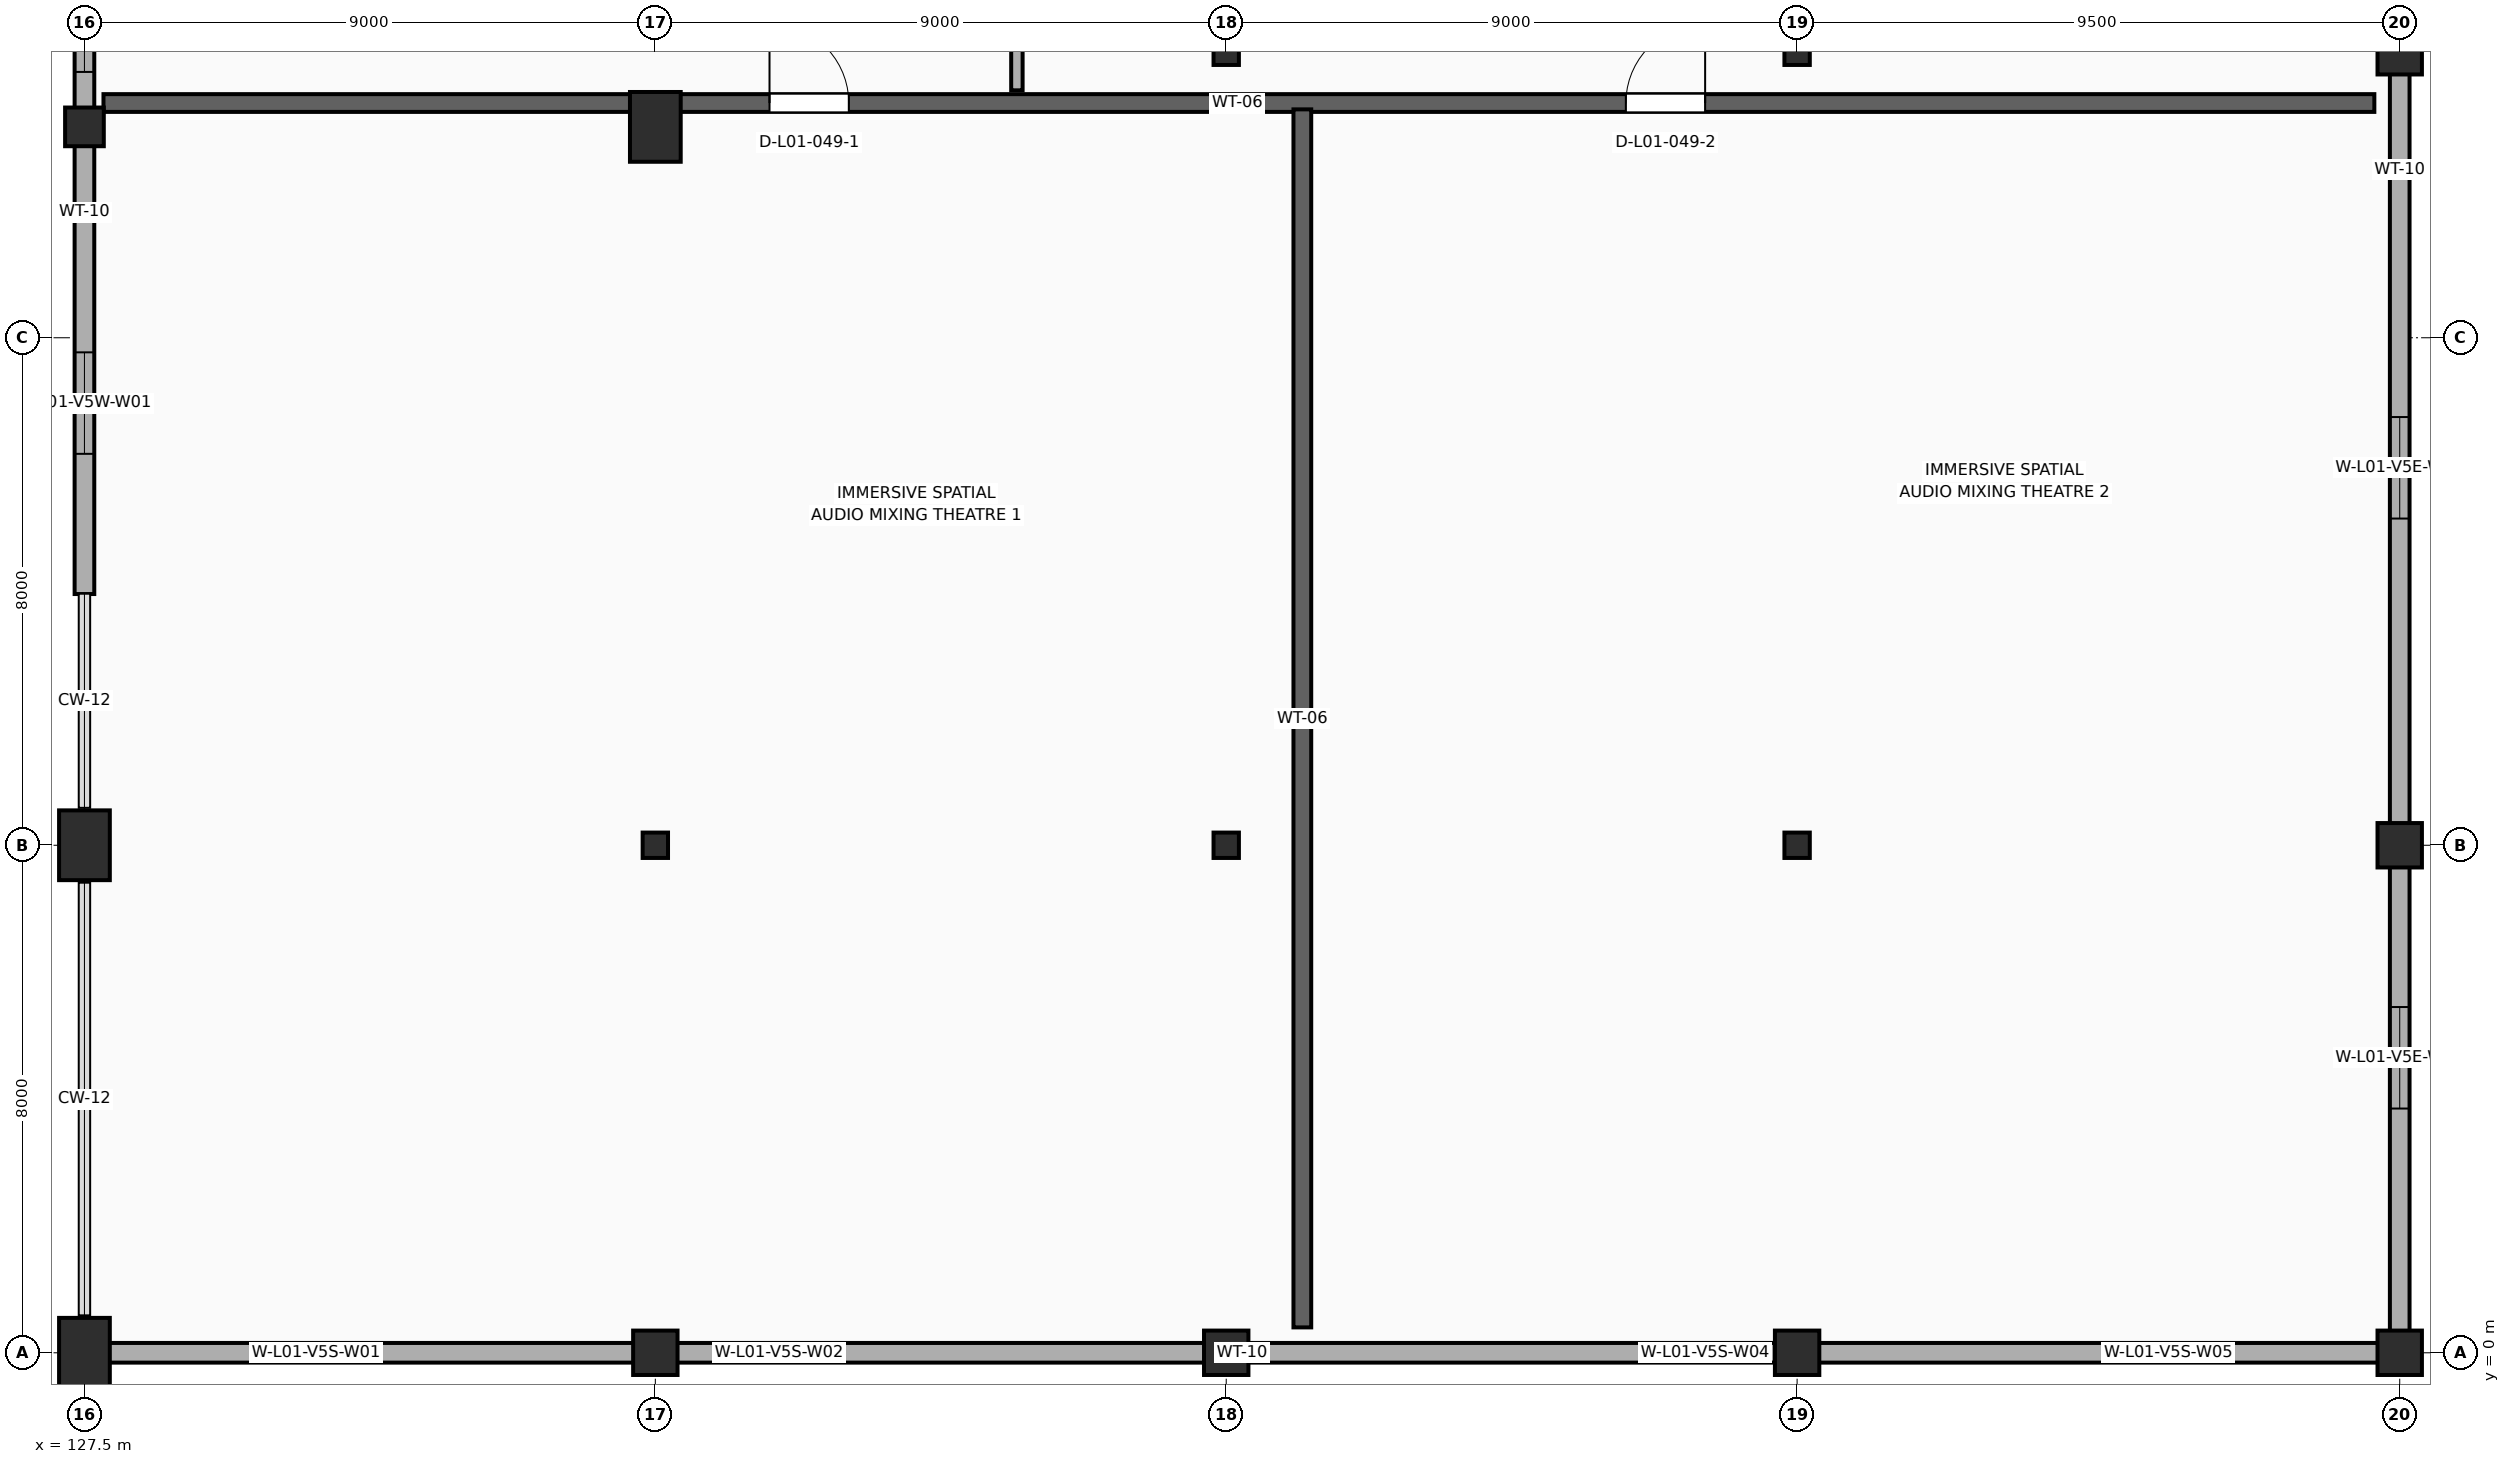
"""IFC4 building model, lengths in metres.
Left out: names, types, materials, properties, quantities, classifications, styles, units other than length and angle.
Written with IfcOpenShell. Run it as: python <this file> out.ifc"""

import sys

from ifc_helpers import new_model, si_unit, direction, frame, frame_2d, origin, origin_2d, place, context, subcontext, project, spatial, rectangle, hollow_rectangle, hollow_circle, extrude, element, fill, save


model = new_model("IFC4")
c1 = context("Model", 3, precision=1e-05, world=origin(), true_north=direction((0.0, 1.0)))
c2 = subcontext(c1, "Body", "Model", "MODEL_VIEW")
j1 = project(units=[si_unit("LENGTHUNIT", "METRE"), si_unit("PLANEANGLEUNIT", "RADIAN")], contexts=[c1])
p1 = place(None, origin())
s1 = spatial("IfcSite", under=j1, at=p1, CompositionType="ELEMENT")
p2 = place(p1, origin())
s2 = spatial("IfcBuilding", under=s1, at=p2, CompositionType="ELEMENT")
p3 = place(p2, frame((0.0, 0.0, 5.4)))
s3 = spatial("IfcBuildingStorey", under=s2, at=p3, CompositionType="ELEMENT", Elevation=5.4)
for number, where, z_axis, x_axis in (
    (1, (127.5, 0.0, 0.0), (0.0, 0.0, 1.0), (1.0, 0.0, 0.0)),
    (2, (127.5, 8.0, 0.0), (0.0, 0.0, 1.0), (1.0, 0.0, 0.0)),
):
    element("IfcColumn", number, at=place(p3, frame(where, z_axis=z_axis, x_axis=x_axis)), inside=s3, PredefinedType="COLUMN", context=c2, shape_type="SweptSolid", body=[
        extrude(rectangle(XDim=0.8, YDim=1.1, at=origin_2d()), origin(), (0.0, 0.0, 1.0), 4.54),
    ])
p4 = place(p3, frame((136.5, 0.0, 0.0), z_axis=(0.0, 0.0, 1.0), x_axis=(1.0, 0.0, 0.0)))
e3 = element("IfcColumn", 3, at=p4, inside=s3, PredefinedType="COLUMN", context=c2, shape_type="SweptSolid", body=[
    extrude(rectangle(XDim=0.7, YDim=0.7, at=origin_2d()), origin(), (0.0, 0.0, 1.0), 4.54),
])
p5 = place(p3, frame((136.5, 8.0, 0.0), z_axis=(0.0, 0.0, 1.0), x_axis=(1.0, 0.0, 0.0)))
e4 = element("IfcColumn", 4, at=p5, inside=s3, PredefinedType="COLUMN", context=c2, shape_type="SweptSolid", body=[
    extrude(hollow_rectangle(XDim=0.4, YDim=0.4, WallThickness=0.016, at=origin_2d()), origin(), (0.0, 0.0, 1.0), 4.54),
])
p6 = place(p3, frame((145.5, 0.0, 0.0), z_axis=(0.0, 0.0, 1.0), x_axis=(1.0, 0.0, 0.0)))
e5 = element("IfcColumn", 5, at=p6, inside=s3, PredefinedType="COLUMN", context=c2, shape_type="SweptSolid", body=[
    extrude(rectangle(XDim=0.7, YDim=0.7, at=origin_2d()), origin(), (0.0, 0.0, 1.0), 4.54),
])
for number, where, z_axis, x_axis in (
    (6, (145.5, 8.0, 0.0), (0.0, 0.0, 1.0), (1.0, 0.0, 0.0)),
    (7, (145.5, 20.5, 0.0), (0.0, 0.0, 1.0), (1.0, 0.0, 0.0)),
):
    element("IfcColumn", number, at=place(p3, frame(where, z_axis=z_axis, x_axis=x_axis)), inside=s3, PredefinedType="COLUMN", context=c2, shape_type="SweptSolid", body=[
        extrude(hollow_rectangle(XDim=0.4, YDim=0.4, WallThickness=0.016, at=origin_2d()), origin(), (0.0, 0.0, 1.0), 4.54),
    ])
p7 = place(p3, frame((154.5, 0.0, 0.0), z_axis=(0.0, 0.0, 1.0), x_axis=(1.0, 0.0, 0.0)))
e8 = element("IfcColumn", 8, at=p7, inside=s3, PredefinedType="COLUMN", context=c2, shape_type="SweptSolid", body=[
    extrude(rectangle(XDim=0.7, YDim=0.7, at=origin_2d()), origin(), (0.0, 0.0, 1.0), 4.54),
])
for number, where, z_axis, x_axis in (
    (9, (154.5, 8.0, 0.0), (0.0, 0.0, 1.0), (1.0, 0.0, 0.0)),
    (10, (154.5, 20.5, 0.0), (0.0, 0.0, 1.0), (1.0, 0.0, 0.0)),
):
    element("IfcColumn", number, at=place(p3, frame(where, z_axis=z_axis, x_axis=x_axis)), inside=s3, PredefinedType="COLUMN", context=c2, shape_type="SweptSolid", body=[
        extrude(hollow_rectangle(XDim=0.4, YDim=0.4, WallThickness=0.016, at=origin_2d()), origin(), (0.0, 0.0, 1.0), 4.54),
    ])
for number, where, z_axis, x_axis in (
    (11, (164.0, 0.0, 0.0), (0.0, 0.0, 1.0), (1.0, 0.0, 0.0)),
    (12, (164.0, 8.0, 0.0), (0.0, 0.0, 1.0), (1.0, 0.0, 0.0)),
    (13, (164.0, 20.5, 0.0), (0.0, 0.0, 1.0), (1.0, 0.0, 0.0)),
):
    element("IfcColumn", number, at=place(p3, frame(where, z_axis=z_axis, x_axis=x_axis)), inside=s3, PredefinedType="COLUMN", context=c2, shape_type="SweptSolid", body=[
        extrude(rectangle(XDim=0.7, YDim=0.7, at=origin_2d()), origin(), (0.0, 0.0, 1.0), 4.54),
    ])
p8 = place(p3, frame((136.5, 19.324, 0.0), z_axis=(0.0, 0.0, 1.0), x_axis=(1.0, 0.0, 0.0)))
e14 = element("IfcColumn", 14, at=p8, inside=s3, PredefinedType="COLUMN", context=c2, shape_type="SweptSolid", body=[
    extrude(rectangle(XDim=0.8, YDim=1.1, at=origin_2d()), origin(), (0.0, 0.0, 1.0), 4.54),
])
p9 = place(p3, frame((127.5, 19.324, 0.0), z_axis=(0.0, 0.0, 1.0), x_axis=(1.0, 0.0, 0.0)))
e15 = element("IfcColumn", 15, at=p9, inside=s3, PredefinedType="COLUMN", context=c2, shape_type="SweptSolid", body=[
    extrude(hollow_circle(Radius=0.305, WallThickness=0.02, at=origin_2d()), origin(), (0.0, 0.0, 1.0), 4.54),
])
p10 = place(p3, frame((127.5, 11.96, 0.0), z_axis=(0.0, 0.0, 1.0), x_axis=(0.0, 1.0, 0.0)))
e16 = element("IfcWall", 16, at=p10, inside=s3, PredefinedType="STANDARD", context=c2, shape_type="SweptSolid", body=[
    extrude(rectangle(XDim=12.04, YDim=0.31, at=frame_2d((6.02, 0.0))), origin(), (0.0, 0.0, 1.0), 4.148),
])
p11 = place(p10, frame((2.21, 0.0, 1.0)))
e17 = element("IfcOpeningElement", 17, at=p11, cuts=e16, PredefinedType="OPENING", context=c2, shape_type="SweptSolid", body=[
    extrude(rectangle(XDim=1.6, YDim=2.2, at=frame_2d((0.8, 1.1))), frame((0.0, 0.167, 0.0), z_axis=(0.0, -1.0, 0.0), x_axis=(1.0, 0.0, 0.0)), (0.0, 0.0, 1.0), 0.334),
])
p12 = place(p10, frame((8.23, 0.0, 1.0)))
e18 = element("IfcOpeningElement", 18, at=p12, cuts=e16, PredefinedType="OPENING", context=c2, shape_type="SweptSolid", body=[
    extrude(rectangle(XDim=1.6, YDim=2.2, at=frame_2d((0.8, 1.1))), frame((0.0, 0.167, 0.0), z_axis=(0.0, -1.0, 0.0), x_axis=(1.0, 0.0, 0.0)), (0.0, 0.0, 1.0), 0.334),
])
p13 = place(p3, frame((127.5, 0.0, 0.0), z_axis=(0.0, 0.0, 1.0), x_axis=(1.0, 0.0, 0.0)))
e19 = element("IfcWall", 19, at=p13, inside=s3, PredefinedType="STANDARD", context=c2, shape_type="SweptSolid", body=[
    extrude(rectangle(XDim=36.5, YDim=0.31, at=frame_2d((18.25, 0.0))), origin(), (0.0, 0.0, 1.0), 4.198),
])
p14 = place(p13, frame((2.85, 0.0, 1.0)))
e20 = element("IfcOpeningElement", 20, at=p14, cuts=e19, PredefinedType="OPENING", context=c2, shape_type="SweptSolid", body=[
    extrude(rectangle(XDim=1.6, YDim=2.2, at=frame_2d((0.8, 1.1))), frame((0.0, 0.167, 0.0), z_axis=(0.0, -1.0, 0.0), x_axis=(1.0, 0.0, 0.0)), (0.0, 0.0, 1.0), 0.334),
])
p15 = place(p13, frame((10.15, 0.0, 1.0)))
e21 = element("IfcOpeningElement", 21, at=p15, cuts=e19, PredefinedType="OPENING", context=c2, shape_type="SweptSolid", body=[
    extrude(rectangle(XDim=1.6, YDim=2.2, at=frame_2d((0.8, 1.1))), frame((0.0, 0.167, 0.0), z_axis=(0.0, -1.0, 0.0), x_axis=(1.0, 0.0, 0.0)), (0.0, 0.0, 1.0), 0.334),
])
p16 = place(p13, frame((24.75, 0.0, 1.0)))
e22 = element("IfcOpeningElement", 22, at=p16, cuts=e19, PredefinedType="OPENING", context=c2, shape_type="SweptSolid", body=[
    extrude(rectangle(XDim=1.6, YDim=2.2, at=frame_2d((0.8, 1.1))), frame((0.0, 0.167, 0.0), z_axis=(0.0, -1.0, 0.0), x_axis=(1.0, 0.0, 0.0)), (0.0, 0.0, 1.0), 0.334),
])
p17 = place(p13, frame((32.05, 0.0, 1.0)))
e23 = element("IfcOpeningElement", 23, at=p17, cuts=e19, PredefinedType="OPENING", context=c2, shape_type="SweptSolid", body=[
    extrude(rectangle(XDim=1.6, YDim=2.2, at=frame_2d((0.8, 1.1))), frame((0.0, 0.167, 0.0), z_axis=(0.0, -1.0, 0.0), x_axis=(1.0, 0.0, 0.0)), (0.0, 0.0, 1.0), 0.334),
])
p18 = place(p3, frame((164.0, 0.0, 0.0), z_axis=(0.0, 0.0, 1.0), x_axis=(0.0, 1.0, 0.0)))
e24 = element("IfcWall", 24, at=p18, inside=s3, PredefinedType="STANDARD", context=c2, shape_type="SweptSolid", body=[
    extrude(rectangle(XDim=46.5, YDim=0.31, at=frame_2d((23.25, 0.0))), origin(), (0.0, 0.0, 1.0), 4.198),
])
p19 = place(p18, frame((3.85, 0.0, 1.0)))
e25 = element("IfcOpeningElement", 25, at=p19, cuts=e24, PredefinedType="OPENING", context=c2, shape_type="SweptSolid", body=[
    extrude(rectangle(XDim=1.6, YDim=2.2, at=frame_2d((0.8, 1.1))), frame((0.0, 0.167, 0.0), z_axis=(0.0, -1.0, 0.0), x_axis=(1.0, 0.0, 0.0)), (0.0, 0.0, 1.0), 0.334),
])
p20 = place(p18, frame((13.15, 0.0, 1.0)))
e26 = element("IfcOpeningElement", 26, at=p20, cuts=e24, PredefinedType="OPENING", context=c2, shape_type="SweptSolid", body=[
    extrude(rectangle(XDim=1.6, YDim=2.2, at=frame_2d((0.8, 1.1))), frame((0.0, 0.167, 0.0), z_axis=(0.0, -1.0, 0.0), x_axis=(1.0, 0.0, 0.0)), (0.0, 0.0, 1.0), 0.334),
])
p21 = place(p18, frame((22.45, 0.0, 1.0)))
e27 = element("IfcOpeningElement", 27, at=p21, cuts=e24, PredefinedType="OPENING", context=c2, shape_type="SweptSolid", body=[
    extrude(rectangle(XDim=1.6, YDim=2.2, at=frame_2d((0.8, 1.1))), frame((0.0, 0.167, 0.0), z_axis=(0.0, -1.0, 0.0), x_axis=(1.0, 0.0, 0.0)), (0.0, 0.0, 1.0), 0.334),
])
p22 = place(p18, frame((31.75, 0.0, 1.0)))
e28 = element("IfcOpeningElement", 28, at=p22, cuts=e24, PredefinedType="OPENING", context=c2, shape_type="SweptSolid", body=[
    extrude(rectangle(XDim=1.6, YDim=2.2, at=frame_2d((0.8, 1.1))), frame((0.0, 0.167, 0.0), z_axis=(0.0, -1.0, 0.0), x_axis=(1.0, 0.0, 0.0)), (0.0, 0.0, 1.0), 0.334),
])
p23 = place(p18, frame((41.05, 0.0, 1.0)))
e29 = element("IfcOpeningElement", 29, at=p23, cuts=e24, PredefinedType="OPENING", context=c2, shape_type="SweptSolid", body=[
    extrude(rectangle(XDim=1.6, YDim=2.2, at=frame_2d((0.8, 1.1))), frame((0.0, 0.167, 0.0), z_axis=(0.0, -1.0, 0.0), x_axis=(1.0, 0.0, 0.0)), (0.0, 0.0, 1.0), 0.334),
])
p24 = place(p3, frame((127.8, 19.7, 0.0), z_axis=(0.0, 0.0, 1.0), x_axis=(1.0, 0.0, 0.0)))
e30 = element("IfcWall", 30, at=p24, inside=s3, PredefinedType="STANDARD", context=c2, shape_type="SweptSolid", body=[
    extrude(rectangle(XDim=35.8, YDim=0.28, at=frame_2d((17.9, 0.0))), origin(), (0.0, 0.0, 1.0), 4.5),
])
p25 = place(p24, frame((10.5, 0.0, 0.0)))
e31 = element("IfcOpeningElement", 31, at=p25, cuts=e30, PredefinedType="OPENING", context=c2, shape_type="SweptSolid", body=[
    extrude(rectangle(XDim=1.25, YDim=2.25, at=frame_2d((0.625, 1.125))), frame((0.0, 0.152, 0.0), z_axis=(0.0, -1.0, 0.0), x_axis=(1.0, 0.0, 0.0)), (0.0, 0.0, 1.0), 0.304),
])
p26 = place(p24, frame((24.0, 0.0, 0.0)))
e32 = element("IfcOpeningElement", 32, at=p26, cuts=e30, PredefinedType="OPENING", context=c2, shape_type="SweptSolid", body=[
    extrude(rectangle(XDim=1.25, YDim=2.25, at=frame_2d((0.625, 1.125))), frame((0.0, 0.152, 0.0), z_axis=(0.0, -1.0, 0.0), x_axis=(1.0, 0.0, 0.0)), (0.0, 0.0, 1.0), 0.304),
])
p27 = place(p3, frame((146.7, 0.4, 0.0), z_axis=(0.0, 0.0, 1.0), x_axis=(0.0, 1.0, 0.0)))
e33 = element("IfcWall", 33, at=p27, inside=s3, PredefinedType="STANDARD", context=c2, shape_type="SweptSolid", body=[
    extrude(rectangle(XDim=19.2, YDim=0.28, at=frame_2d((9.6, 0.0))), origin(), (0.0, 0.0, 1.0), 4.5),
])
p28 = place(p3, frame((142.2, 19.9, 0.0), z_axis=(0.0, 0.0, 1.0), x_axis=(0.0, 1.0, 0.0)))
e34 = element("IfcWall", 34, at=p28, inside=s3, PredefinedType="PARTITIONING", context=c2, shape_type="SweptSolid", body=[
    extrude(rectangle(XDim=26.3, YDim=0.18, at=frame_2d((13.15, 0.0))), origin(), (0.0, 0.0, 1.0), 4.148),
])
p29 = place(p28, frame((6.0, 0.0, 0.0)))
e35 = element("IfcOpeningElement", 35, at=p29, cuts=e34, PredefinedType="OPENING", context=c2, shape_type="SweptSolid", body=[
    extrude(rectangle(XDim=1.0, YDim=2.15, at=frame_2d((0.5, 1.075))), frame((0.0, 0.102, 0.0), z_axis=(0.0, -1.0, 0.0), x_axis=(1.0, 0.0, 0.0)), (0.0, 0.0, 1.0), 0.204),
])
p30 = place(p28, frame((16.0, 0.0, 0.0)))
e36 = element("IfcOpeningElement", 36, at=p30, cuts=e34, PredefinedType="OPENING", context=c2, shape_type="SweptSolid", body=[
    extrude(rectangle(XDim=0.9, YDim=2.15, at=frame_2d((0.45, 1.075))), frame((0.0, 0.102, 0.0), z_axis=(0.0, -1.0, 0.0), x_axis=(1.0, 0.0, 0.0)), (0.0, 0.0, 1.0), 0.204),
])
p31 = place(p28, frame((22.5, 0.0, 0.0)))
e37 = element("IfcOpeningElement", 37, at=p31, cuts=e34, PredefinedType="OPENING", context=c2, shape_type="SweptSolid", body=[
    extrude(rectangle(XDim=0.9, YDim=2.1, at=frame_2d((0.45, 1.05))), frame((0.0, 0.102, 0.0), z_axis=(0.0, -1.0, 0.0), x_axis=(1.0, 0.0, 0.0)), (0.0, 0.0, 1.0), 0.204),
])
p32 = place(p11, origin())
e38 = element("IfcWindow", 38, at=p32, inside=s3, PartitioningType="SINGLE_PANEL", PredefinedType="WINDOW", context=c2, shape_type="SweptSolid", body=[
    extrude(rectangle(XDim=1.6, YDim=2.2, at=frame_2d((0.8, 1.1))), frame((0.0, 0.03, 0.0), z_axis=(0.0, -1.0, 0.0), x_axis=(1.0, 0.0, 0.0)), (0.0, 0.0, 1.0), 0.06),
])
fill(e17, e38)
p33 = place(p12, origin())
e39 = element("IfcWindow", 39, at=p33, inside=s3, PartitioningType="SINGLE_PANEL", PredefinedType="WINDOW", context=c2, shape_type="SweptSolid", body=[
    extrude(rectangle(XDim=1.6, YDim=2.2, at=frame_2d((0.8, 1.1))), frame((0.0, 0.03, 0.0), z_axis=(0.0, -1.0, 0.0), x_axis=(1.0, 0.0, 0.0)), (0.0, 0.0, 1.0), 0.06),
])
fill(e18, e39)
p34 = place(p14, origin())
e40 = element("IfcWindow", 40, at=p34, inside=s3, PartitioningType="SINGLE_PANEL", PredefinedType="WINDOW", context=c2, shape_type="SweptSolid", body=[
    extrude(rectangle(XDim=1.6, YDim=2.2, at=frame_2d((0.8, 1.1))), frame((0.0, 0.03, 0.0), z_axis=(0.0, -1.0, 0.0), x_axis=(1.0, 0.0, 0.0)), (0.0, 0.0, 1.0), 0.06),
])
fill(e20, e40)
p35 = place(p15, origin())
e41 = element("IfcWindow", 41, at=p35, inside=s3, PartitioningType="SINGLE_PANEL", PredefinedType="WINDOW", context=c2, shape_type="SweptSolid", body=[
    extrude(rectangle(XDim=1.6, YDim=2.2, at=frame_2d((0.8, 1.1))), frame((0.0, 0.03, 0.0), z_axis=(0.0, -1.0, 0.0), x_axis=(1.0, 0.0, 0.0)), (0.0, 0.0, 1.0), 0.06),
])
fill(e21, e41)
p36 = place(p16, origin())
e42 = element("IfcWindow", 42, at=p36, inside=s3, PartitioningType="SINGLE_PANEL", PredefinedType="WINDOW", context=c2, shape_type="SweptSolid", body=[
    extrude(rectangle(XDim=1.6, YDim=2.2, at=frame_2d((0.8, 1.1))), frame((0.0, 0.03, 0.0), z_axis=(0.0, -1.0, 0.0), x_axis=(1.0, 0.0, 0.0)), (0.0, 0.0, 1.0), 0.06),
])
fill(e22, e42)
p37 = place(p17, origin())
e43 = element("IfcWindow", 43, at=p37, inside=s3, PartitioningType="SINGLE_PANEL", PredefinedType="WINDOW", context=c2, shape_type="SweptSolid", body=[
    extrude(rectangle(XDim=1.6, YDim=2.2, at=frame_2d((0.8, 1.1))), frame((0.0, 0.03, 0.0), z_axis=(0.0, -1.0, 0.0), x_axis=(1.0, 0.0, 0.0)), (0.0, 0.0, 1.0), 0.06),
])
fill(e23, e43)
p38 = place(p19, origin())
e44 = element("IfcWindow", 44, at=p38, inside=s3, PartitioningType="SINGLE_PANEL", PredefinedType="WINDOW", context=c2, shape_type="SweptSolid", body=[
    extrude(rectangle(XDim=1.6, YDim=2.2, at=frame_2d((0.8, 1.1))), frame((0.0, 0.03, 0.0), z_axis=(0.0, -1.0, 0.0), x_axis=(1.0, 0.0, 0.0)), (0.0, 0.0, 1.0), 0.06),
])
fill(e25, e44)
p39 = place(p20, origin())
e45 = element("IfcWindow", 45, at=p39, inside=s3, PartitioningType="SINGLE_PANEL", PredefinedType="WINDOW", context=c2, shape_type="SweptSolid", body=[
    extrude(rectangle(XDim=1.6, YDim=2.2, at=frame_2d((0.8, 1.1))), frame((0.0, 0.03, 0.0), z_axis=(0.0, -1.0, 0.0), x_axis=(1.0, 0.0, 0.0)), (0.0, 0.0, 1.0), 0.06),
])
fill(e26, e45)
p40 = place(p25, origin())
e46 = element("IfcDoor", 46, at=p40, inside=s3, OperationType="SINGLE_SWING_LEFT", PredefinedType="DOOR", context=c2, shape_type="SweptSolid", body=[
    extrude(rectangle(XDim=1.25, YDim=2.25, at=frame_2d((0.625, 1.125))), frame((0.0, 0.025, 0.0), z_axis=(0.0, -1.0, 0.0), x_axis=(1.0, 0.0, 0.0)), (0.0, 0.0, 1.0), 0.05),
])
fill(e31, e46)
p41 = place(p26, origin())
e47 = element("IfcDoor", 47, at=p41, inside=s3, OperationType="SINGLE_SWING_RIGHT", PredefinedType="DOOR", context=c2, shape_type="SweptSolid", body=[
    extrude(rectangle(XDim=1.25, YDim=2.25, at=frame_2d((0.625, 1.125))), frame((0.0, 0.025, 0.0), z_axis=(0.0, -1.0, 0.0), x_axis=(1.0, 0.0, 0.0)), (0.0, 0.0, 1.0), 0.05),
])
fill(e32, e47)
save(model, sys.argv[1])
